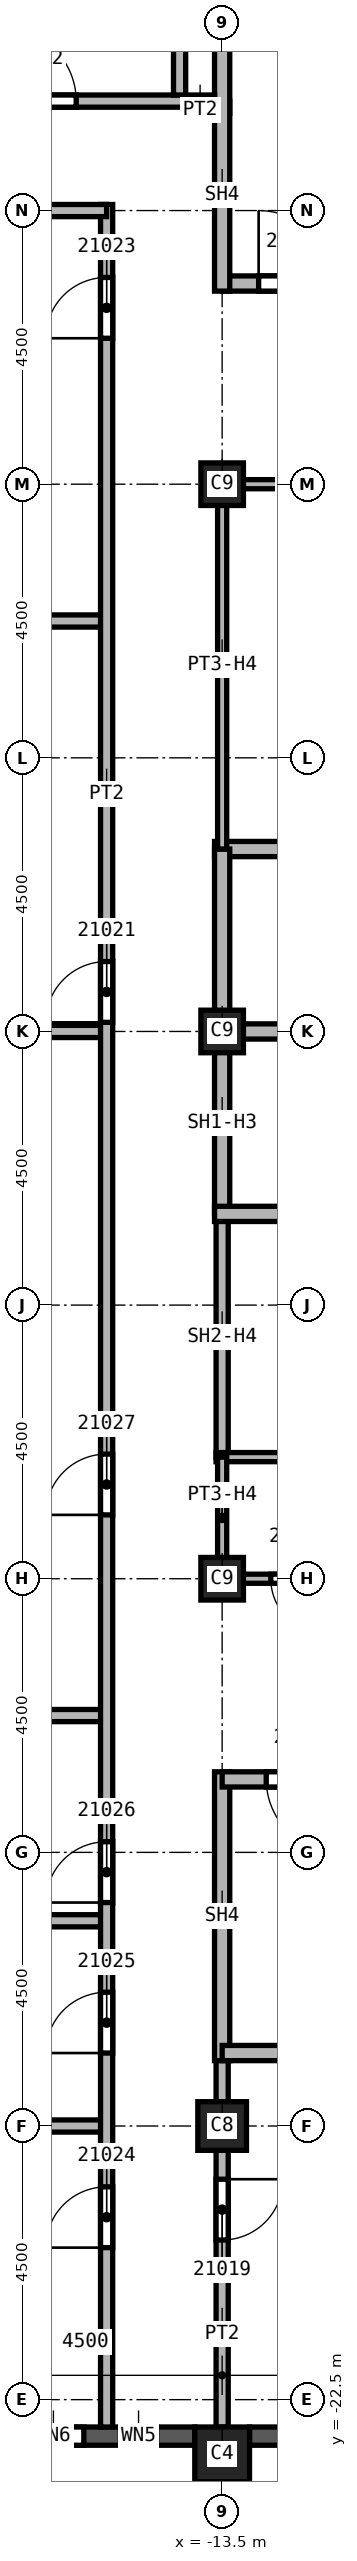
"""IFC4 building model, lengths in metres.
Left out: names, types, materials, properties, quantities, classifications, styles, units other than length and angle.
Written with IfcOpenShell. Run it as: python <this file> out.ifc"""

import sys

from ifc_helpers import new_model, si_unit, direction, frame, frame_2d, origin, origin_2d, place, context, subcontext, project, spatial, rectangle, extrude, element, fill, save


model = new_model("IFC4")
c1 = context("Model", 3, precision=1e-05, world=origin(), true_north=direction((0.0, 1.0)))
c2 = subcontext(c1, "Body", "Model", "MODEL_VIEW")
j1 = project(units=[si_unit("LENGTHUNIT", "METRE"), si_unit("PLANEANGLEUNIT", "RADIAN")], contexts=[c1])
p1 = place(None, origin())
s1 = spatial("IfcSite", under=j1, at=p1, CompositionType="ELEMENT")
p2 = place(p1, origin())
s2 = spatial("IfcBuilding", under=s1, at=p2, CompositionType="ELEMENT")
p3 = place(p2, frame((0.0, 0.0, 300.0)))
s3 = spatial("IfcBuildingStorey", under=s2, at=p3, CompositionType="ELEMENT", Elevation=300.0)
p4 = place(p3, frame((-13.5, -18.0, 0.0), z_axis=(0.0, 0.0, 1.0), x_axis=(1.0, 0.0, 0.0)))
e1 = element("IfcColumn", 1, at=p4, inside=s3, PredefinedType="COLUMN", context=c2, shape_type="SweptSolid", body=[
    extrude(rectangle(XDim=0.8, YDim=0.8, at=origin_2d()), origin(), (0.0, 0.0, 1.0), 3.74),
])
for number, where, z_axis, x_axis in (
    (2, (-13.5, 0.0, 0.0), (0.0, 0.0, 1.0), (1.0, 0.0, 0.0)),
    (3, (-13.5, 9.0, 0.0), (0.0, 0.0, 1.0), (1.0, 0.0, 0.0)),
    (4, (-13.5, -9.0, 0.0), (0.0, 0.0, 1.0), (1.0, 0.0, 0.0)),
):
    element("IfcColumn", number, at=place(p3, frame(where, z_axis=z_axis, x_axis=x_axis)), inside=s3, PredefinedType="COLUMN", context=c2, shape_type="SweptSolid", body=[
        extrude(rectangle(XDim=0.7, YDim=0.7, at=origin_2d()), origin(), (0.0, 0.0, 1.0), 3.74),
    ])
p5 = place(p3, frame((-13.5, -23.4, 0.0), z_axis=(0.0, 0.0, 1.0), x_axis=(1.0, 0.0, 0.0)))
e5 = element("IfcColumn", 5, at=p5, inside=s3, PredefinedType="COLUMN", context=c2, shape_type="SweptSolid", body=[
    extrude(rectangle(XDim=0.9, YDim=0.9, at=origin_2d()), origin(), (0.0, 0.0, 1.0), 3.74),
])
p6 = place(p3, frame((-17.55, -23.1, 0.0), z_axis=(0.0, 0.0, 1.0), x_axis=(1.0, 0.0, 0.0)))
e6 = element("IfcWall", 6, at=p6, inside=s3, PredefinedType="SOLIDWALL", context=c2, shape_type="SweptSolid", body=[
    extrude(rectangle(XDim=3.6, YDim=0.3, at=frame_2d((1.8, 0.0))), origin(), (0.0, 0.0, 1.0), 3.14),
])
p7 = place(p6, frame((0.775, 0.0, 0.8)))
e7 = element("IfcOpeningElement", 7, at=p7, cuts=e6, PredefinedType="OPENING", context=c2, shape_type="SweptSolid", body=[
    extrude(rectangle(XDim=1.0, YDim=1.95, at=frame_2d((0.5, 0.975))), frame((0.0, 0.15, 0.0), z_axis=(0.0, -1.0, 0.0), x_axis=(1.0, 0.0, 0.0)), (0.0, 0.0, 1.0), 0.3),
])
p8 = place(p6, frame((2.375, 0.0, 0.8)))
e8 = element("IfcOpeningElement", 8, at=p8, cuts=e6, PredefinedType="OPENING", context=c2, shape_type="SweptSolid", body=[
    extrude(rectangle(XDim=0.6, YDim=1.95, at=frame_2d((0.3, 0.975))), frame((0.0, 0.15, 0.0), z_axis=(0.0, -1.0, 0.0), x_axis=(1.0, 0.0, 0.0)), (0.0, 0.0, 1.0), 0.3),
])
p9 = place(p3, frame((-13.05, -23.1, 0.0), z_axis=(0.0, 0.0, 1.0), x_axis=(1.0, 0.0, 0.0)))
e9 = element("IfcWall", 9, at=p9, inside=s3, PredefinedType="SOLIDWALL", context=c2, shape_type="SweptSolid", body=[
    extrude(rectangle(XDim=3.6, YDim=0.3, at=frame_2d((1.8, 0.0))), origin(), (0.0, 0.0, 1.0), 3.14),
])
p10 = place(p9, frame((0.6, 0.0, 0.8)))
e10 = element("IfcOpeningElement", 10, at=p10, cuts=e9, PredefinedType="OPENING", context=c2, shape_type="SweptSolid", body=[
    extrude(rectangle(XDim=2.4, YDim=1.95, at=frame_2d((1.2, 0.975))), frame((0.0, 0.15, 0.0), z_axis=(0.0, -1.0, 0.0), x_axis=(1.0, 0.0, 0.0)), (0.0, 0.0, 1.0), 0.3),
])
for number, where, z_axis, x_axis in (
    (11, (-26.55, -14.625, 0.0), (0.0, 0.0, 1.0), (1.0, 0.0, 0.0)),
    (12, (-26.55, -11.25, 0.0), (0.0, 0.0, 1.0), (1.0, 0.0, 0.0)),
    (13, (-26.55, 6.75, 0.0), (0.0, 0.0, 1.0), (1.0, 0.0, 0.0)),
):
    element("IfcWall", number, at=place(p3, frame(where, z_axis=z_axis, x_axis=x_axis)), inside=s3, PredefinedType="PARTITIONING", context=c2, shape_type="SweptSolid", body=[
        extrude(rectangle(XDim=11.15, YDim=0.2, at=frame_2d((5.575, 0.0))), origin(), (0.0, 0.0, 1.0), 3.74),
    ])
p11 = place(p3, frame((-24.3, -18.0, 0.0), z_axis=(0.0, 0.0, 1.0), x_axis=(1.0, 0.0, 0.0)))
e14 = element("IfcWall", 14, at=p11, inside=s3, PredefinedType="PARTITIONING", context=c2, shape_type="SweptSolid", body=[
    extrude(rectangle(XDim=8.9, YDim=0.2, at=frame_2d((4.45, 0.0))), origin(), (0.0, 0.0, 1.0), 3.74),
])
p12 = place(p3, frame((-15.4, 0.0, 0.0), z_axis=(0.0, 0.0, 1.0), x_axis=(-1.0, 0.0, 0.0)))
e15 = element("IfcWall", 15, at=p12, inside=s3, PredefinedType="PARTITIONING", context=c2, shape_type="SweptSolid", body=[
    extrude(rectangle(XDim=11.15, YDim=0.2, at=frame_2d((5.575, 0.0))), origin(), (0.0, 0.0, 1.0), 3.74),
])
p13 = place(p3, frame((-15.4, -22.95, 0.0), z_axis=(0.0, 0.0, 1.0), x_axis=(0.0, 1.0, 0.0)))
e16 = element("IfcWall", 16, at=p13, inside=s3, PredefinedType="PARTITIONING", context=c2, shape_type="SweptSolid", body=[
    extrude(rectangle(XDim=36.55, YDim=0.2, at=frame_2d((18.275, 0.0))), origin(), (0.0, 0.0, 1.0), 3.74),
])
p14 = place(p13, frame((23.1, 0.0, 0.0)))
e17 = element("IfcOpeningElement", 17, at=p14, cuts=e16, PredefinedType="OPENING", context=c2, shape_type="SweptSolid", body=[
    extrude(rectangle(XDim=1.0, YDim=2.1, at=frame_2d((0.5, 1.05))), frame((0.0, 0.1, 0.0), z_axis=(0.0, -1.0, 0.0), x_axis=(1.0, 0.0, 0.0)), (0.0, 0.0, 1.0), 0.2),
])
p15 = place(p13, frame((34.35, 0.0, 0.0)))
e18 = element("IfcOpeningElement", 18, at=p15, cuts=e16, PredefinedType="OPENING", context=c2, shape_type="SweptSolid", body=[
    extrude(rectangle(XDim=1.0, YDim=2.1, at=frame_2d((0.5, 1.05))), frame((0.0, 0.1, 0.0), z_axis=(0.0, -1.0, 0.0), x_axis=(1.0, 0.0, 0.0)), (0.0, 0.0, 1.0), 0.2),
])
p16 = place(p13, frame((2.95, 0.0, 0.0)))
e19 = element("IfcOpeningElement", 19, at=p16, cuts=e16, PredefinedType="OPENING", context=c2, shape_type="SweptSolid", body=[
    extrude(rectangle(XDim=1.0, YDim=2.1, at=frame_2d((0.5, 1.05))), frame((0.0, 0.1, 0.0), z_axis=(0.0, -1.0, 0.0), x_axis=(1.0, 0.0, 0.0)), (0.0, 0.0, 1.0), 0.2),
])
p17 = place(p13, frame((6.15, 0.0, 0.0)))
e20 = element("IfcOpeningElement", 20, at=p17, cuts=e16, PredefinedType="OPENING", context=c2, shape_type="SweptSolid", body=[
    extrude(rectangle(XDim=1.0, YDim=2.1, at=frame_2d((0.5, 1.05))), frame((0.0, 0.1, 0.0), z_axis=(0.0, -1.0, 0.0), x_axis=(1.0, 0.0, 0.0)), (0.0, 0.0, 1.0), 0.2),
])
p18 = place(p13, frame((8.625, 0.0, 0.0)))
e21 = element("IfcOpeningElement", 21, at=p18, cuts=e16, PredefinedType="OPENING", context=c2, shape_type="SweptSolid", body=[
    extrude(rectangle(XDim=1.0, YDim=2.1, at=frame_2d((0.5, 1.05))), frame((0.0, 0.1, 0.0), z_axis=(0.0, -1.0, 0.0), x_axis=(1.0, 0.0, 0.0)), (0.0, 0.0, 1.0), 0.2),
])
p19 = place(p13, frame((15.0, 0.0, 0.0)))
e22 = element("IfcOpeningElement", 22, at=p19, cuts=e16, PredefinedType="OPENING", context=c2, shape_type="SweptSolid", body=[
    extrude(rectangle(XDim=1.0, YDim=2.1, at=frame_2d((0.5, 1.05))), frame((0.0, 0.1, 0.0), z_axis=(0.0, -1.0, 0.0), x_axis=(1.0, 0.0, 0.0)), (0.0, 0.0, 1.0), 0.2),
])
p20 = place(p3, frame((-15.4, 13.5, 0.0), z_axis=(0.0, 0.0, 1.0), x_axis=(-1.0, 0.0, 0.0)))
e23 = element("IfcWall", 23, at=p20, inside=s3, PredefinedType="PARTITIONING", context=c2, shape_type="SweptSolid", body=[
    extrude(rectangle(XDim=6.8, YDim=0.2, at=frame_2d((3.4, 0.0))), origin(), (0.0, 0.0, 1.0), 3.74),
])
p21 = place(p3, frame((-14.1, 15.2, 0.0), z_axis=(0.0, 0.0, 1.0), x_axis=(1.0, 0.0, 0.0)))
e24 = element("IfcWall", 24, at=p21, inside=s3, PredefinedType="PARTITIONING", context=c2, shape_type="SweptSolid", body=[
    extrude(rectangle(XDim=0.725, YDim=0.2, at=frame_2d((0.363, 0.0))), origin(), (0.0, 0.0, 1.0), 3.74),
])
p22 = place(p3, frame((-13.5, -16.675, 0.0), z_axis=(0.0, 0.0, 1.0), x_axis=(0.0, -1.0, 0.0)))
e25 = element("IfcWall", 25, at=p22, inside=s3, PredefinedType="PARTITIONING", context=c2, shape_type="SweptSolid", body=[
    extrude(rectangle(XDim=6.275, YDim=0.2, at=frame_2d((3.137, 0.0))), origin(), (0.0, 0.0, 1.0), 3.74),
])
p23 = place(p22, frame((2.2, 0.0, 0.0)))
e26 = element("IfcOpeningElement", 26, at=p23, cuts=e25, PredefinedType="OPENING", context=c2, shape_type="SweptSolid", body=[
    extrude(rectangle(XDim=1.0, YDim=2.1, at=frame_2d((0.5, 1.05))), frame((0.0, 0.1, 0.0), z_axis=(0.0, -1.0, 0.0), x_axis=(1.0, 0.0, 0.0)), (0.0, 0.0, 1.0), 0.2),
])
p24 = place(p3, frame((-13.5, -7.0, 0.0), z_axis=(0.0, 0.0, 1.0), x_axis=(0.0, 1.0, 0.0)))
e27 = element("IfcWall", 27, at=p24, inside=s3, PredefinedType="SOLIDWALL", context=c2, shape_type="SweptSolid", body=[
    extrude(rectangle(XDim=4.0, YDim=0.2, at=frame_2d((2.0, 0.0))), origin(), (0.0, 0.0, 1.0), 3.062),
])
p25 = place(p3, frame((-13.625, 0.0, 0.0), z_axis=(0.0, 0.0, 1.0), x_axis=(1.0, 0.0, 0.0)))
e28 = element("IfcWall", 28, at=p25, inside=s3, PredefinedType="SOLIDWALL", context=c2, shape_type="SweptSolid", body=[
    extrude(rectangle(XDim=3.125, YDim=0.25, at=frame_2d((1.562, 0.0))), origin(), (0.0, 0.0, 1.0), 3.74),
])
p26 = place(p3, frame((-13.625, 3.0, 0.0), z_axis=(0.0, 0.0, 1.0), x_axis=(1.0, 0.0, 0.0)))
e29 = element("IfcWall", 29, at=p26, inside=s3, PredefinedType="SOLIDWALL", context=c2, shape_type="SweptSolid", body=[
    extrude(rectangle(XDim=6.125, YDim=0.25, at=frame_2d((3.062, 0.0))), origin(), (0.0, 0.0, 1.0), 3.74),
])
p27 = place(p26, frame((4.0, 0.0, 0.0)))
e30 = element("IfcOpeningElement", 30, at=p27, cuts=e29, PredefinedType="OPENING", context=c2, shape_type="SweptSolid", body=[
    extrude(rectangle(XDim=1.1, YDim=2.1, at=frame_2d((0.55, 1.05))), frame((0.0, 0.125, 0.0), z_axis=(0.0, -1.0, 0.0), x_axis=(1.0, 0.0, 0.0)), (0.0, 0.0, 1.0), 0.25),
])
p28 = place(p3, frame((-13.5, -3.0, 0.0), z_axis=(0.0, 0.0, 1.0), x_axis=(0.0, 1.0, 0.0)))
e31 = element("IfcWall", 31, at=p28, inside=s3, PredefinedType="SOLIDWALL", context=c2, shape_type="SweptSolid", body=[
    extrude(rectangle(XDim=6.0, YDim=0.25, at=frame_2d((3.0, 0.0))), origin(), (0.0, 0.0, 1.0), 3.062),
])
p29 = place(p3, frame((-13.625, -3.0, 0.0), z_axis=(0.0, 0.0, 1.0), x_axis=(1.0, 0.0, 0.0)))
e32 = element("IfcWall", 32, at=p29, inside=s3, PredefinedType="SOLIDWALL", context=c2, shape_type="SweptSolid", body=[
    extrude(rectangle(XDim=6.125, YDim=0.25, at=frame_2d((3.062, 0.0))), origin(), (0.0, 0.0, 1.0), 3.74),
])
p30 = place(p29, frame((4.0, 0.0, 0.0)))
e33 = element("IfcOpeningElement", 33, at=p30, cuts=e32, PredefinedType="OPENING", context=c2, shape_type="SweptSolid", body=[
    extrude(rectangle(XDim=1.1, YDim=2.1, at=frame_2d((0.55, 1.05))), frame((0.0, 0.125, 0.0), z_axis=(0.0, -1.0, 0.0), x_axis=(1.0, 0.0, 0.0)), (0.0, 0.0, 1.0), 0.25),
])
p31 = place(p3, frame((-13.5, -12.175, 0.0), z_axis=(0.0, 0.0, 1.0), x_axis=(0.0, -1.0, 0.0)))
e34 = element("IfcWall", 34, at=p31, inside=s3, PredefinedType="SOLIDWALL", context=c2, shape_type="SweptSolid", body=[
    extrude(rectangle(XDim=4.75, YDim=0.25, at=frame_2d((2.375, 0.0))), origin(), (0.0, 0.0, 1.0), 3.74),
])
p32 = place(p3, frame((-13.5, 12.3, 0.0), z_axis=(0.0, 0.0, 1.0), x_axis=(1.0, 0.0, 0.0)))
e35 = element("IfcWall", 35, at=p32, inside=s3, PredefinedType="SOLIDWALL", context=c2, shape_type="SweptSolid", body=[
    extrude(rectangle(XDim=9.125, YDim=0.25, at=frame_2d((4.562, 0.0))), origin(), (0.0, 0.0, 1.0), 3.74),
])
p33 = place(p32, frame((0.6, 0.0, 0.0)))
e36 = element("IfcOpeningElement", 36, at=p33, cuts=e35, PredefinedType="OPENING", context=c2, shape_type="SweptSolid", body=[
    extrude(rectangle(XDim=1.2, YDim=2.1, at=frame_2d((0.6, 1.05))), frame((0.0, 0.125, 0.0), z_axis=(0.0, -1.0, 0.0), x_axis=(1.0, 0.0, 0.0)), (0.0, 0.0, 1.0), 0.25),
])
p34 = place(p3, frame((-13.5, 12.175, 0.0), z_axis=(0.0, 0.0, 1.0), x_axis=(0.0, 1.0, 0.0)))
e37 = element("IfcWall", 37, at=p34, inside=s3, PredefinedType="SOLIDWALL", context=c2, shape_type="SweptSolid", body=[
    extrude(rectangle(XDim=4.75, YDim=0.25, at=frame_2d((2.375, 0.0))), origin(), (0.0, 0.0, 1.0), 3.74),
])
p35 = place(p3, frame((-4.5, -16.8, 0.0), z_axis=(0.0, 0.0, 1.0), x_axis=(-1.0, 0.0, 0.0)))
e38 = element("IfcWall", 38, at=p35, inside=s3, PredefinedType="SOLIDWALL", context=c2, shape_type="SweptSolid", body=[
    extrude(rectangle(XDim=9.0, YDim=0.25, at=frame_2d((4.5, 0.0))), origin(), (0.0, 0.0, 1.0), 3.74),
])
p36 = place(p3, frame((-4.375, -12.3, 0.0), z_axis=(0.0, 0.0, 1.0), x_axis=(-1.0, 0.0, 0.0)))
e39 = element("IfcWall", 39, at=p36, inside=s3, PredefinedType="SOLIDWALL", context=c2, shape_type="SweptSolid", body=[
    extrude(rectangle(XDim=9.125, YDim=0.25, at=frame_2d((4.562, 0.0))), origin(), (0.0, 0.0, 1.0), 3.74),
])
p37 = place(p36, frame((7.2, 0.0, 0.0)))
e40 = element("IfcOpeningElement", 40, at=p37, cuts=e39, PredefinedType="OPENING", context=c2, shape_type="SweptSolid", body=[
    extrude(rectangle(XDim=1.2, YDim=2.1, at=frame_2d((0.6, 1.05))), frame((0.0, 0.125, 0.0), z_axis=(0.0, -1.0, 0.0), x_axis=(1.0, 0.0, 0.0)), (0.0, 0.0, 1.0), 0.25),
])
p38 = place(p3, frame((-13.6, -7.0, 0.0), z_axis=(0.0, 0.0, 1.0), x_axis=(1.0, 0.0, 0.0)))
e41 = element("IfcWall", 41, at=p38, inside=s3, PredefinedType="PARTITIONING", context=c2, shape_type="SweptSolid", body=[
    extrude(rectangle(XDim=3.1, YDim=0.15, at=frame_2d((1.55, 0.0))), origin(), (0.0, 0.0, 1.0), 3.74),
])
p39 = place(p3, frame((-13.5, -9.075, 0.0), z_axis=(0.0, 0.0, 1.0), x_axis=(0.0, 1.0, 0.0)))
e42 = element("IfcWall", 42, at=p39, inside=s3, PredefinedType="PARTITIONING", context=c2, shape_type="SweptSolid", body=[
    extrude(rectangle(XDim=2.075, YDim=0.15, at=frame_2d((1.038, 0.0))), origin(), (0.0, 0.0, 1.0), 3.062),
])
p40 = place(p3, frame((-13.5, 3.0, 0.0), z_axis=(0.0, 0.0, 1.0), x_axis=(0.0, 1.0, 0.0)))
e43 = element("IfcWall", 43, at=p40, inside=s3, PredefinedType="PARTITIONING", context=c2, shape_type="SweptSolid", body=[
    extrude(rectangle(XDim=6.075, YDim=0.15, at=frame_2d((3.038, 0.0))), origin(), (0.0, 0.0, 1.0), 3.062),
])
p41 = place(p3, frame((-13.5, 9.0, 0.0), z_axis=(0.0, 0.0, 1.0), x_axis=(1.0, 0.0, 0.0)))
e44 = element("IfcWall", 44, at=p41, inside=s3, PredefinedType="PARTITIONING", context=c2, shape_type="SweptSolid", body=[
    extrude(rectangle(XDim=3.0, YDim=0.15, at=frame_2d((1.5, 0.0))), origin(), (0.0, 0.0, 1.0), 3.062),
])
p42 = place(p3, frame((-10.5, -9.0, 0.0), z_axis=(0.0, 0.0, 1.0), x_axis=(-1.0, 0.0, 0.0)))
e45 = element("IfcWall", 45, at=p42, inside=s3, PredefinedType="PARTITIONING", context=c2, shape_type="SweptSolid", body=[
    extrude(rectangle(XDim=3.0, YDim=0.15, at=frame_2d((1.5, 0.0))), origin(), (0.0, 0.0, 1.0), 3.062),
])
p43 = place(p42, frame((1.3, 0.0, 0.0)))
e46 = element("IfcOpeningElement", 46, at=p43, cuts=e45, PredefinedType="OPENING", context=c2, shape_type="SweptSolid", body=[
    extrude(rectangle(XDim=0.9, YDim=2.1, at=frame_2d((0.45, 1.05))), frame((0.0, 0.075, 0.0), z_axis=(0.0, -1.0, 0.0), x_axis=(1.0, 0.0, 0.0)), (0.0, 0.0, 1.0), 0.15),
])
p44 = place(p3, frame((-21.9, 15.3, 0.0), z_axis=(0.0, 0.0, 1.0), x_axis=(1.0, 0.0, 0.0)))
e47 = element("IfcWall", 47, at=p44, inside=s3, PredefinedType="SOLIDWALL", context=c2, shape_type="SweptSolid", body=[
    extrude(rectangle(XDim=8.275, YDim=0.2, at=frame_2d((4.137, 0.0))), origin(), (0.0, 0.0, 1.0), 3.74),
])
p45 = place(p44, frame((4.8, 0.0, 0.0)))
e48 = element("IfcOpeningElement", 48, at=p45, cuts=e47, PredefinedType="OPENING", context=c2, shape_type="SweptSolid", body=[
    extrude(rectangle(XDim=1.2, YDim=2.1, at=frame_2d((0.6, 1.05))), frame((0.0, 0.1, 0.0), z_axis=(0.0, -1.0, 0.0), x_axis=(1.0, 0.0, 0.0)), (0.0, 0.0, 1.0), 0.2),
])
p46 = place(p3, frame((-14.2, 15.4, 0.0), z_axis=(0.0, 0.0, 1.0), x_axis=(0.0, 1.0, 0.0)))
e49 = element("IfcWall", 49, at=p46, inside=s3, PredefinedType="SOLIDWALL", context=c2, shape_type="SweptSolid", body=[
    extrude(rectangle(XDim=5.9, YDim=0.2, at=frame_2d((2.95, 0.0))), origin(), (0.0, 0.0, 1.0), 3.74),
])
p47 = place(p43, origin())
e50 = element("IfcDoor", 50, at=p47, inside=s3, OperationType="SINGLE_SWING_RIGHT", PredefinedType="DOOR", context=c2, shape_type="SweptSolid", body=[
    extrude(rectangle(XDim=0.9, YDim=2.1, at=frame_2d((0.45, 1.05))), frame((0.0, 0.025, 0.0), z_axis=(0.0, -1.0, 0.0), x_axis=(1.0, 0.0, 0.0)), (0.0, 0.0, 1.0), 0.05),
])
fill(e46, e50)
p48 = place(p33, origin())
e51 = element("IfcDoor", 51, at=p48, inside=s3, OperationType="SINGLE_SWING_LEFT", PredefinedType="DOOR", context=c2, shape_type="SweptSolid", body=[
    extrude(rectangle(XDim=1.2, YDim=2.1, at=frame_2d((0.6, 1.05))), frame((0.0, 0.025, 0.0), z_axis=(0.0, -1.0, 0.0), x_axis=(1.0, 0.0, 0.0)), (0.0, 0.0, 1.0), 0.05),
])
fill(e36, e51)
p49 = place(p37, origin())
e52 = element("IfcDoor", 52, at=p49, inside=s3, OperationType="SINGLE_SWING_RIGHT", PredefinedType="DOOR", context=c2, shape_type="SweptSolid", body=[
    extrude(rectangle(XDim=1.2, YDim=2.1, at=frame_2d((0.6, 1.05))), frame((0.0, 0.025, 0.0), z_axis=(0.0, -1.0, 0.0), x_axis=(1.0, 0.0, 0.0)), (0.0, 0.0, 1.0), 0.05),
])
fill(e40, e52)
p50 = place(p23, origin())
e53 = element("IfcDoor", 53, at=p50, inside=s3, OperationType="SINGLE_SWING_RIGHT", PredefinedType="DOOR", context=c2, shape_type="SweptSolid", body=[
    extrude(rectangle(XDim=1.0, YDim=2.1, at=frame_2d((0.5, 1.05))), frame((0.0, 0.025, 0.0), z_axis=(0.0, -1.0, 0.0), x_axis=(1.0, 0.0, 0.0)), (0.0, 0.0, 1.0), 0.05),
])
fill(e26, e53)
p51 = place(p14, origin())
e54 = element("IfcDoor", 54, at=p51, inside=s3, OperationType="SINGLE_SWING_RIGHT", PredefinedType="DOOR", context=c2, shape_type="SweptSolid", body=[
    extrude(rectangle(XDim=1.0, YDim=2.1, at=frame_2d((0.5, 1.05))), frame((0.0, 0.025, 0.0), z_axis=(0.0, -1.0, 0.0), x_axis=(1.0, 0.0, 0.0)), (0.0, 0.0, 1.0), 0.05),
])
fill(e17, e54)
p52 = place(p15, origin())
e55 = element("IfcDoor", 55, at=p52, inside=s3, OperationType="SINGLE_SWING_RIGHT", PredefinedType="DOOR", context=c2, shape_type="SweptSolid", body=[
    extrude(rectangle(XDim=1.0, YDim=2.1, at=frame_2d((0.5, 1.05))), frame((0.0, 0.025, 0.0), z_axis=(0.0, -1.0, 0.0), x_axis=(1.0, 0.0, 0.0)), (0.0, 0.0, 1.0), 0.05),
])
fill(e18, e55)
p53 = place(p16, origin())
e56 = element("IfcDoor", 56, at=p53, inside=s3, OperationType="SINGLE_SWING_LEFT", PredefinedType="DOOR", context=c2, shape_type="SweptSolid", body=[
    extrude(rectangle(XDim=1.0, YDim=2.1, at=frame_2d((0.5, 1.05))), frame((0.0, 0.025, 0.0), z_axis=(0.0, -1.0, 0.0), x_axis=(1.0, 0.0, 0.0)), (0.0, 0.0, 1.0), 0.05),
])
fill(e19, e56)
p54 = place(p17, origin())
e57 = element("IfcDoor", 57, at=p54, inside=s3, OperationType="SINGLE_SWING_RIGHT", PredefinedType="DOOR", context=c2, shape_type="SweptSolid", body=[
    extrude(rectangle(XDim=1.0, YDim=2.1, at=frame_2d((0.5, 1.05))), frame((0.0, 0.025, 0.0), z_axis=(0.0, -1.0, 0.0), x_axis=(1.0, 0.0, 0.0)), (0.0, 0.0, 1.0), 0.05),
])
fill(e20, e57)
p55 = place(p18, origin())
e58 = element("IfcDoor", 58, at=p55, inside=s3, OperationType="SINGLE_SWING_LEFT", PredefinedType="DOOR", context=c2, shape_type="SweptSolid", body=[
    extrude(rectangle(XDim=1.0, YDim=2.1, at=frame_2d((0.5, 1.05))), frame((0.0, 0.025, 0.0), z_axis=(0.0, -1.0, 0.0), x_axis=(1.0, 0.0, 0.0)), (0.0, 0.0, 1.0), 0.05),
])
fill(e21, e58)
p56 = place(p19, origin())
e59 = element("IfcDoor", 59, at=p56, inside=s3, OperationType="SINGLE_SWING_RIGHT", PredefinedType="DOOR", context=c2, shape_type="SweptSolid", body=[
    extrude(rectangle(XDim=1.0, YDim=2.1, at=frame_2d((0.5, 1.05))), frame((0.0, 0.025, 0.0), z_axis=(0.0, -1.0, 0.0), x_axis=(1.0, 0.0, 0.0)), (0.0, 0.0, 1.0), 0.05),
])
fill(e22, e59)
p57 = place(p45, origin())
e60 = element("IfcDoor", 60, at=p57, inside=s3, OperationType="SINGLE_SWING_RIGHT", PredefinedType="DOOR", context=c2, shape_type="SweptSolid", body=[
    extrude(rectangle(XDim=1.2, YDim=2.1, at=frame_2d((0.6, 1.05))), frame((0.0, 0.025, 0.0), z_axis=(0.0, -1.0, 0.0), x_axis=(1.0, 0.0, 0.0)), (0.0, 0.0, 1.0), 0.05),
])
fill(e48, e60)
p58 = place(p7, origin())
e61 = element("IfcWindow", 61, at=p58, inside=s3, PartitioningType="SINGLE_PANEL", PredefinedType="WINDOW", context=c2, shape_type="SweptSolid", body=[
    extrude(rectangle(XDim=1.0, YDim=1.95, at=frame_2d((0.5, 0.975))), frame((0.0, 0.03, 0.0), z_axis=(0.0, -1.0, 0.0), x_axis=(1.0, 0.0, 0.0)), (0.0, 0.0, 1.0), 0.06),
])
fill(e7, e61)
p59 = place(p8, origin())
e62 = element("IfcWindow", 62, at=p59, inside=s3, PartitioningType="SINGLE_PANEL", PredefinedType="WINDOW", context=c2, shape_type="SweptSolid", body=[
    extrude(rectangle(XDim=0.6, YDim=1.95, at=frame_2d((0.3, 0.975))), frame((0.0, 0.03, 0.0), z_axis=(0.0, -1.0, 0.0), x_axis=(1.0, 0.0, 0.0)), (0.0, 0.0, 1.0), 0.06),
])
fill(e8, e62)
save(model, sys.argv[1])
